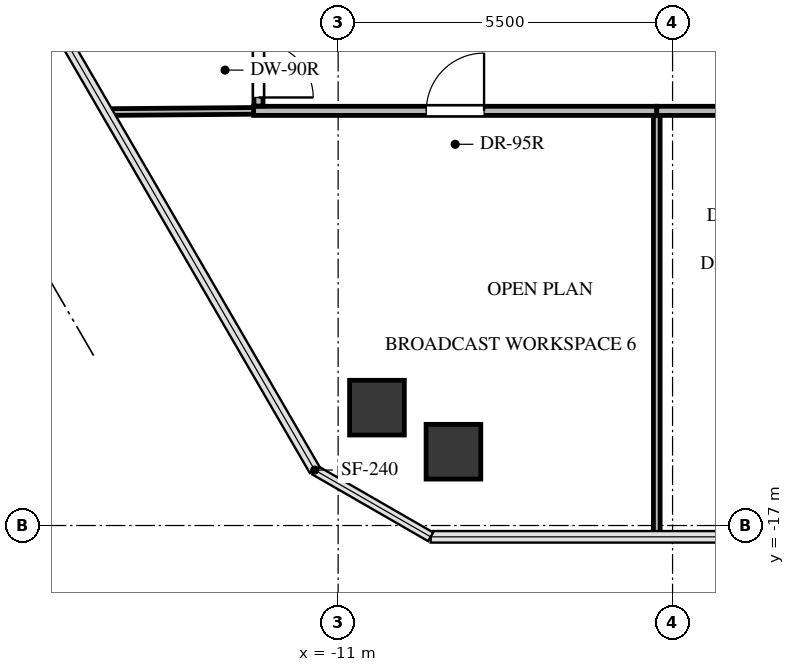
"""IFC4 building model, lengths in metres.
Left out: names, types, materials, properties, quantities, classifications, styles, units other than length and angle.
Written with IfcOpenShell. Run it as: python <this file> out.ifc"""

import sys

from ifc_helpers import new_model, si_unit, direction, frame, frame_2d, origin, origin_2d, place, context, subcontext, project, spatial, rectangle, extrude, source, transform, mapped, element, fill, save


model = new_model("IFC4")
c1 = context("Model", 3, precision=1e-05, world=origin(), true_north=direction((0.0, 1.0)))
c2 = subcontext(c1, "Body", "Model", "MODEL_VIEW")
j1 = project(units=[si_unit("LENGTHUNIT", "METRE"), si_unit("PLANEANGLEUNIT", "RADIAN")], contexts=[c1])
p1 = place(None, origin())
s1 = spatial("IfcSite", under=j1, at=p1, CompositionType="ELEMENT")
p2 = place(p1, origin())
s2 = spatial("IfcBuilding", under=s1, at=p2, CompositionType="ELEMENT")
p3 = place(p2, frame((0.0, 0.0, 261.5)))
s3 = spatial("IfcBuildingStorey", under=s2, at=p3, CompositionType="ELEMENT", Elevation=261.5)
m1 = source(origin(), c2, "Body", "SweptSolid", [
    extrude(rectangle(XDim=0.9, YDim=0.9, at=origin_2d()), origin(), (0.0, 0.0, 1.0), 3.34),
])
for number, where, z_axis, x_axis in (
    (1, (-10.361, -15.062, -0.24), (0.0, 0.0, 1.0), (1.0, 0.0, 0.0)),
    (2, (-9.104, -15.786, -0.24), (0.0, 0.0, 1.0), (1.0, 0.0, 0.0)),
):
    element("IfcColumn", number, at=place(p3, frame(where, z_axis=z_axis, x_axis=x_axis)), inside=s3, PredefinedType="COLUMN", context=c2, shape_type="MappedRepresentation", body=[
        mapped(m1, transform((0.0, 0.0, 0.0), x_axis=(1.0, 0.0, 0.0), y_axis=(0.0, 1.0, 0.0), z_axis=(0.0, 0.0, 1.0), scale=1.0)),
    ])
p4 = place(p3, frame((-12.39, -10.18, 0.0), z_axis=(0.0, 0.0, 1.0), x_axis=(1.0, 0.0, 0.0)))
e3 = element("IfcWall", 3, at=p4, inside=s3, PredefinedType="PARTITIONING", context=c2, shape_type="SweptSolid", body=[
    extrude(rectangle(XDim=6.63, YDim=0.15, at=frame_2d((3.315, 0.0))), origin(), (0.0, 0.0, 1.0), 3.085),
])
p5 = place(p4, frame((2.84, 0.0, 0.0)))
e4 = element("IfcOpeningElement", 4, at=p5, cuts=e3, PredefinedType="OPENING", context=c2, shape_type="SweptSolid", body=[
    extrude(rectangle(XDim=0.95, YDim=2.1, at=frame_2d((0.475, 1.05))), frame((0.0, 0.085, 0.0), z_axis=(0.0, -1.0, 0.0), x_axis=(1.0, 0.0, 0.0)), (0.0, 0.0, 1.0), 0.17),
])
p6 = place(p3, frame((-5.76, -10.18, 0.0), z_axis=(0.0, 0.0, 1.0), x_axis=(1.0, 0.0, 0.0)))
e5 = element("IfcWall", 5, at=p6, inside=s3, PredefinedType="PARTITIONING", context=c2, shape_type="SweptSolid", body=[
    extrude(rectangle(XDim=4.671, YDim=0.15, at=frame_2d((2.335, 0.0))), origin(), (0.0, 0.0, 1.0), 2.341),
])
p7 = place(p3, frame((-12.31, -8.919, 0.0), z_axis=(0.0, 0.0, 1.0), x_axis=(0.0, -1.0, 0.0)))
e6 = element("IfcWall", 6, at=p7, inside=s3, PredefinedType="PARTITIONING", context=c2, shape_type="SweptSolid", body=[
    extrude(rectangle(XDim=1.182, YDim=0.15, at=frame_2d((0.591, 0.0))), origin(), (0.0, 0.0, 1.0), 3.085),
])
p8 = place(p7, frame((0.141, 0.0, 0.0)))
e7 = element("IfcOpeningElement", 7, at=p8, cuts=e6, PredefinedType="OPENING", context=c2, shape_type="SweptSolid", body=[
    extrude(rectangle(XDim=0.9, YDim=2.05, at=frame_2d((0.45, 1.025))), frame((0.0, 0.085, 0.0), z_axis=(0.0, -1.0, 0.0), x_axis=(1.0, 0.0, 0.0)), (0.0, 0.0, 1.0), 0.17),
])
p9 = place(p3, frame((-5.76, -10.259, 0.0), z_axis=(0.0, 0.0, 1.0), x_axis=(0.0, -1.0, 0.0)))
e8 = element("IfcWall", 8, at=p9, inside=s3, PredefinedType="MOVABLE", context=c2, shape_type="SweptSolid", body=[
    extrude(rectangle(XDim=6.927, YDim=0.11, at=frame_2d((3.463, 0.0))), origin(), (0.0, 0.0, 1.0), 2.341),
])
p10 = place(p3, frame((-14.802, -10.2, 0.0), z_axis=(0.0, 0.0, 1.0), x_axis=(0.999968020968, 0.007997314604, 0.0)))
e9 = element("IfcWall", 9, at=p10, inside=s3, PredefinedType="MOVABLE", context=c2, shape_type="SweptSolid", body=[
    extrude(rectangle(XDim=2.412, YDim=0.11, at=frame_2d((1.206, 0.0))), origin(), (0.0, 0.0, 1.0), 2.439),
])
m2 = source(origin(), c2, "Body", "SweptSolid", [
    extrude(rectangle(XDim=0.95, YDim=2.1, at=frame_2d((0.475, 1.05))), frame((0.0, 0.025, 0.0), z_axis=(0.0, -1.0, 0.0), x_axis=(1.0, 0.0, 0.0)), (0.0, 0.0, 1.0), 0.05),
])
p11 = place(p5, origin())
e10 = element("IfcDoor", 10, at=p11, inside=s3, OperationType="SINGLE_SWING_RIGHT", PredefinedType="DOOR", context=c2, shape_type="MappedRepresentation", body=[
    mapped(m2, transform((0.0, 0.0, 0.0), x_axis=(1.0, 0.0, 0.0), y_axis=(0.0, 1.0, 0.0), z_axis=(0.0, 0.0, 1.0), scale=1.0)),
])
fill(e4, e10)
m3 = source(origin(), c2, "Body", "SweptSolid", [
    extrude(rectangle(XDim=0.9, YDim=2.05, at=frame_2d((0.45, 1.025))), frame((0.0, 0.025, 0.0), z_axis=(0.0, -1.0, 0.0), x_axis=(1.0, 0.0, 0.0)), (0.0, 0.0, 1.0), 0.05),
])
p12 = place(p8, origin())
e11 = element("IfcDoor", 11, at=p12, inside=s3, OperationType="SINGLE_SWING_RIGHT", PredefinedType="DOOR", context=c2, shape_type="MappedRepresentation", body=[
    mapped(m3, transform((0.0, 0.0, 0.0), x_axis=(1.0, 0.0, 0.0), y_axis=(0.0, 1.0, 0.0), z_axis=(0.0, 0.0, 1.0), scale=1.0)),
])
fill(e7, e11)
save(model, sys.argv[1])
